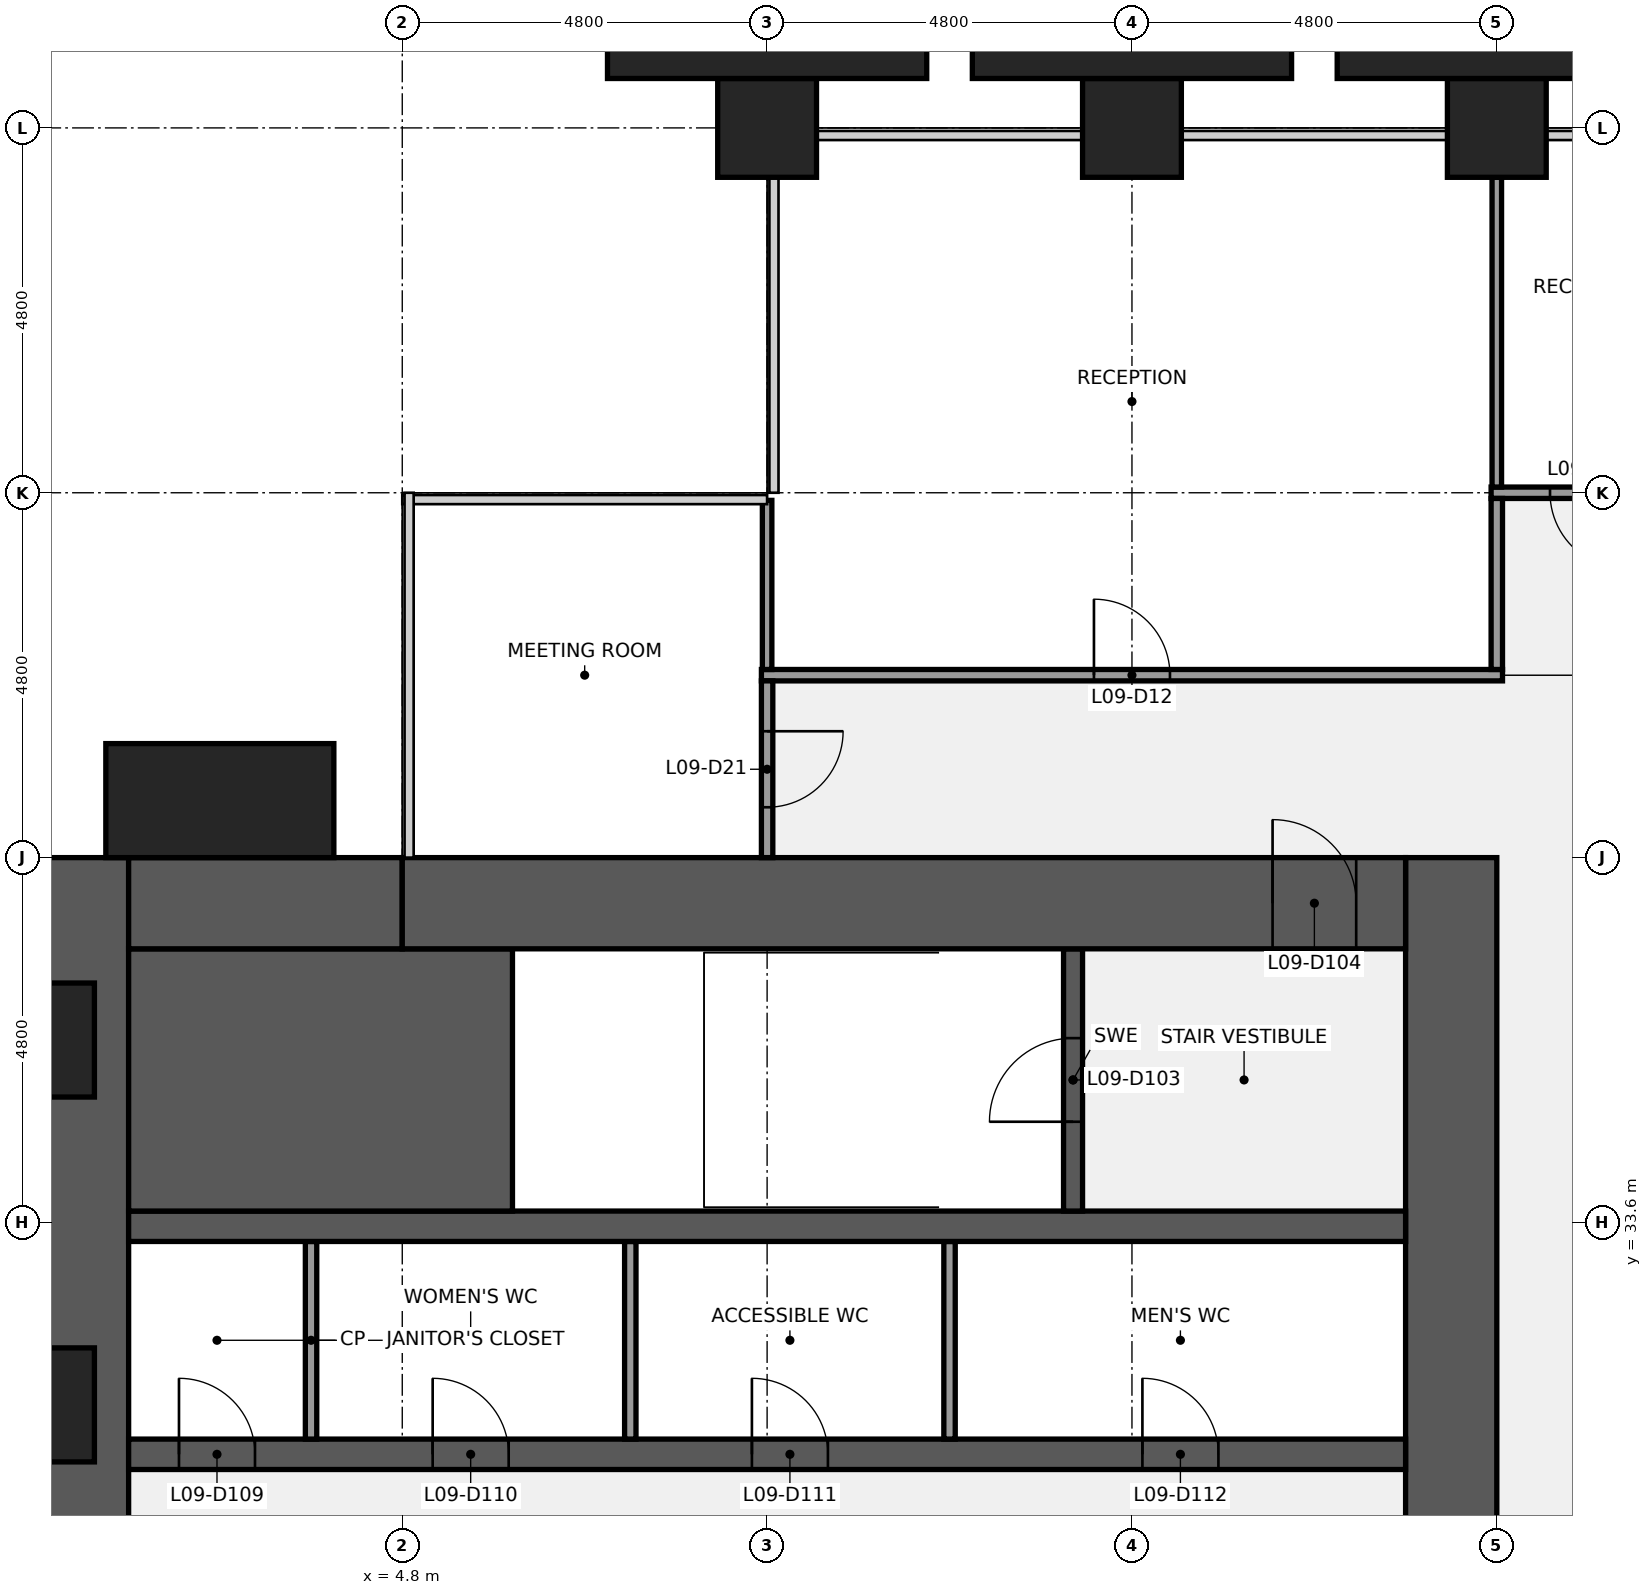
"""IFC4 building model, lengths in metres.
Left out: names, types, materials, properties, quantities, classifications, styles, units other than length and angle.
Written with IfcOpenShell. Run it as: python <this file> out.ifc"""

import sys

from ifc_helpers import new_model, si_unit, direction, frame, frame_2d, origin, origin_2d, place, context, subcontext, project, spatial, rectangle, extrude, element, fill, save


model = new_model("IFC4")
c1 = context("Model", 3, precision=1e-05, world=origin(), true_north=direction((0.0, 1.0)))
c2 = subcontext(c1, "Body", "Model", "MODEL_VIEW")
j1 = project(units=[si_unit("LENGTHUNIT", "METRE"), si_unit("PLANEANGLEUNIT", "RADIAN")], contexts=[c1])
p1 = place(None, origin())
s1 = spatial("IfcSite", under=j1, at=p1, CompositionType="ELEMENT")
p2 = place(p1, origin())
s2 = spatial("IfcBuilding", under=s1, at=p2, CompositionType="ELEMENT")
p3 = place(p2, frame((0.0, 0.0, 47.0)))
s3 = spatial("IfcBuildingStorey", under=s2, at=p3, CompositionType="ELEMENT", Elevation=47.0)
for number, where, z_axis, x_axis in (
    (1, (9.6, 48.0, 0.0), (0.0, 0.0, 1.0), (1.0, 0.0, 0.0)),
    (2, (14.4, 48.0, 0.0), (0.0, 0.0, 1.0), (1.0, 0.0, 0.0)),
    (3, (19.2, 48.0, 0.0), (0.0, 0.0, 1.0), (1.0, 0.0, 0.0)),
):
    element("IfcColumn", number, at=place(p3, frame(where, z_axis=z_axis, x_axis=x_axis)), inside=s3, PredefinedType="COLUMN", context=c2, shape_type="SweptSolid", body=[
        extrude(rectangle(XDim=1.3, YDim=1.3, at=origin_2d()), origin(), (0.0, 0.0, 1.0), 4.0),
    ])
p4 = place(p3, frame((0.6, 9.6, 0.0), z_axis=(0.0, 0.0, 1.0), x_axis=(0.0, 1.0, 0.0)))
e4 = element("IfcWall", 4, at=p4, inside=s3, PredefinedType="SHEAR", context=c2, shape_type="SweptSolid", body=[
    extrude(rectangle(XDim=28.8, YDim=1.2, at=frame_2d((14.4, 0.0))), origin(), (0.0, 0.0, 1.0), 3.84),
])
p5 = place(p4, frame((8.85, 0.0, 0.9)))
e5 = element("IfcOpeningElement", 5, at=p5, cuts=e4, PredefinedType="OPENING", context=c2, shape_type="SweptSolid", body=[
    extrude(rectangle(XDim=1.5, YDim=1.5, at=frame_2d((0.75, 0.75))), frame((0.0, 0.61, 0.0), z_axis=(0.0, -1.0, 0.0), x_axis=(1.0, 0.0, 0.0)), (0.0, 0.0, 1.0), 1.22),
])
p6 = place(p4, frame((18.45, 0.0, 0.9)))
e6 = element("IfcOpeningElement", 6, at=p6, cuts=e4, PredefinedType="OPENING", context=c2, shape_type="SweptSolid", body=[
    extrude(rectangle(XDim=1.5, YDim=1.5, at=frame_2d((0.75, 0.75))), frame((0.0, 0.61, 0.0), z_axis=(0.0, -1.0, 0.0), x_axis=(1.0, 0.0, 0.0)), (0.0, 0.0, 1.0), 1.22),
])
p7 = place(p3, frame((18.6, 38.4, 0.0), z_axis=(0.0, 0.0, 1.0), x_axis=(0.0, -1.0, 0.0)))
e7 = element("IfcWall", 7, at=p7, inside=s3, PredefinedType="SHEAR", context=c2, shape_type="SweptSolid", body=[
    extrude(rectangle(XDim=28.8, YDim=1.2, at=frame_2d((14.4, 0.0))), origin(), (0.0, 0.0, 1.0), 3.84),
])
p8 = place(p7, frame((18.3, 0.0, 0.0)))
e8 = element("IfcOpeningElement", 8, at=p8, cuts=e7, PredefinedType="OPENING", context=c2, shape_type="SweptSolid", body=[
    extrude(rectangle(XDim=1.8, YDim=2.1, at=frame_2d((0.9, 1.05))), frame((0.0, 0.61, 0.0), z_axis=(0.0, -1.0, 0.0), x_axis=(1.0, 0.0, 0.0)), (0.0, 0.0, 1.0), 1.22),
])
p9 = place(p7, frame((8.7, 0.0, 0.0)))
e9 = element("IfcOpeningElement", 9, at=p9, cuts=e7, PredefinedType="OPENING", context=c2, shape_type="SweptSolid", body=[
    extrude(rectangle(XDim=1.8, YDim=2.1, at=frame_2d((0.9, 1.05))), frame((0.0, 0.61, 0.0), z_axis=(0.0, -1.0, 0.0), x_axis=(1.0, 0.0, 0.0)), (0.0, 0.0, 1.0), 1.22),
])
p10 = place(p3, frame((1.2, 30.55, 0.0), z_axis=(0.0, 0.0, 1.0), x_axis=(1.0, 0.0, 0.0)))
e10 = element("IfcWall", 10, at=p10, inside=s3, PredefinedType="SHEAR", context=c2, shape_type="SweptSolid", body=[
    extrude(rectangle(XDim=16.8, YDim=0.4, at=frame_2d((8.4, 0.0))), origin(), (0.0, 0.0, 1.0), 3.84),
])
p11 = place(p10, frame((0.663, 0.0, 0.0)))
e11 = element("IfcOpeningElement", 11, at=p11, cuts=e10, PredefinedType="OPENING", context=c2, shape_type="SweptSolid", body=[
    extrude(rectangle(XDim=1.0, YDim=2.1, at=frame_2d((0.5, 1.05))), frame((0.0, 0.21, 0.0), z_axis=(0.0, -1.0, 0.0), x_axis=(1.0, 0.0, 0.0)), (0.0, 0.0, 1.0), 0.42),
])
p12 = place(p10, frame((4.0, 0.0, 0.0)))
e12 = element("IfcOpeningElement", 12, at=p12, cuts=e10, PredefinedType="OPENING", context=c2, shape_type="SweptSolid", body=[
    extrude(rectangle(XDim=1.0, YDim=2.1, at=frame_2d((0.5, 1.05))), frame((0.0, 0.21, 0.0), z_axis=(0.0, -1.0, 0.0), x_axis=(1.0, 0.0, 0.0)), (0.0, 0.0, 1.0), 0.42),
])
p13 = place(p10, frame((8.2, 0.0, 0.0)))
e13 = element("IfcOpeningElement", 13, at=p13, cuts=e10, PredefinedType="OPENING", context=c2, shape_type="SweptSolid", body=[
    extrude(rectangle(XDim=1.0, YDim=2.1, at=frame_2d((0.5, 1.05))), frame((0.0, 0.21, 0.0), z_axis=(0.0, -1.0, 0.0), x_axis=(1.0, 0.0, 0.0)), (0.0, 0.0, 1.0), 0.42),
])
p14 = place(p10, frame((13.337, 0.0, 0.0)))
e14 = element("IfcOpeningElement", 14, at=p14, cuts=e10, PredefinedType="OPENING", context=c2, shape_type="SweptSolid", body=[
    extrude(rectangle(XDim=1.0, YDim=2.1, at=frame_2d((0.5, 1.05))), frame((0.0, 0.21, 0.0), z_axis=(0.0, -1.0, 0.0), x_axis=(1.0, 0.0, 0.0)), (0.0, 0.0, 1.0), 0.42),
])
for number, where, z_axis, x_axis in (
    (15, (3.6, 30.75, 0.0), (0.0, 0.0, 1.0), (0.0, 1.0, 0.0)),
    (16, (7.8, 30.75, 0.0), (0.0, 0.0, 1.0), (0.0, 1.0, 0.0)),
    (17, (12.0, 30.75, 0.0), (0.0, 0.0, 1.0), (0.0, 1.0, 0.0)),
):
    element("IfcWall", number, at=place(p3, frame(where, z_axis=z_axis, x_axis=x_axis)), inside=s3, PredefinedType="PARTITIONING", context=c2, shape_type="SweptSolid", body=[
        extrude(rectangle(XDim=2.6, YDim=0.15, at=frame_2d((1.3, 0.0))), origin(), (0.0, 0.0, 1.0), 3.84),
    ])
p15 = place(p3, frame((1.2, 33.55, 0.0), z_axis=(0.0, 0.0, 1.0), x_axis=(1.0, 0.0, 0.0)))
e18 = element("IfcWall", 18, at=p15, inside=s3, PredefinedType="SHEAR", context=c2, shape_type="SweptSolid", body=[
    extrude(rectangle(XDim=16.8, YDim=0.4, at=frame_2d((8.4, 0.0))), origin(), (0.0, 0.0, 1.0), 3.84),
])
p16 = place(p3, frame((1.2, 35.475, 0.0), z_axis=(0.0, 0.0, 1.0), x_axis=(1.0, 0.0, 0.0)))
e19 = element("IfcWall", 19, at=p16, inside=s3, PredefinedType="SHEAR", context=c2, shape_type="SweptSolid", body=[
    extrude(rectangle(XDim=5.05, YDim=3.45, at=frame_2d((2.525, 0.0))), origin(), (0.0, 0.0, 1.0), 3.84),
])
p17 = place(p3, frame((13.625, 33.75, 0.0), z_axis=(0.0, 0.0, 1.0), x_axis=(0.0, 1.0, 0.0)))
e20 = element("IfcWall", 20, at=p17, inside=s3, PredefinedType="SHEAR", context=c2, shape_type="SweptSolid", body=[
    extrude(rectangle(XDim=3.45, YDim=0.25, at=frame_2d((1.725, 0.0))), origin(), (0.0, 0.0, 1.0), 3.84),
])
p18 = place(p17, frame((1.175, 0.0, 0.0)))
e21 = element("IfcOpeningElement", 21, at=p18, cuts=e20, PredefinedType="OPENING", context=c2, shape_type="SweptSolid", body=[
    extrude(rectangle(XDim=1.1, YDim=2.1, at=frame_2d((0.55, 1.05))), frame((0.0, 0.135, 0.0), z_axis=(0.0, -1.0, 0.0), x_axis=(1.0, 0.0, 0.0)), (0.0, 0.0, 1.0), 0.27),
])
p19 = place(p3, frame((1.2, 37.8, 0.0), z_axis=(0.0, 0.0, 1.0), x_axis=(1.0, 0.0, 0.0)))
e22 = element("IfcWall", 22, at=p19, inside=s3, PredefinedType="SHEAR", context=c2, shape_type="SweptSolid", body=[
    extrude(rectangle(XDim=3.6, YDim=1.2, at=frame_2d((1.8, 0.0))), origin(), (0.0, 0.0, 1.0), 3.84),
])
p20 = place(p3, frame((4.8, 37.8, 0.0), z_axis=(0.0, 0.0, 1.0), x_axis=(1.0, 0.0, 0.0)))
e23 = element("IfcWall", 23, at=p20, inside=s3, PredefinedType="SHEAR", context=c2, shape_type="SweptSolid", body=[
    extrude(rectangle(XDim=13.2, YDim=1.2, at=frame_2d((6.6, 0.0))), origin(), (0.0, 0.0, 1.0), 3.84),
])
p21 = place(p20, frame((11.45, 0.0, 0.0)))
e24 = element("IfcOpeningElement", 24, at=p21, cuts=e23, PredefinedType="OPENING", context=c2, shape_type="SweptSolid", body=[
    extrude(rectangle(XDim=1.1, YDim=2.1, at=frame_2d((0.55, 1.05))), frame((0.0, 0.61, 0.0), z_axis=(0.0, -1.0, 0.0), x_axis=(1.0, 0.0, 0.0)), (0.0, 0.0, 1.0), 1.22),
])
p22 = place(p3, frame((9.525, 40.8, 0.0), z_axis=(0.0, 0.0, 1.0), x_axis=(1.0, 0.0, 0.0)))
e25 = element("IfcWall", 25, at=p22, inside=s3, PredefinedType="PARTITIONING", context=c2, shape_type="SweptSolid", body=[
    extrude(rectangle(XDim=9.75, YDim=0.15, at=frame_2d((4.875, 0.0))), origin(), (0.0, 0.0, 1.0), 2.87),
])
p23 = place(p22, frame((4.375, 0.0, 0.0)))
e26 = element("IfcOpeningElement", 26, at=p23, cuts=e25, PredefinedType="OPENING", context=c2, shape_type="SweptSolid", body=[
    extrude(rectangle(XDim=1.0, YDim=2.1, at=frame_2d((0.5, 1.05))), frame((0.0, 0.085, 0.0), z_axis=(0.0, -1.0, 0.0), x_axis=(1.0, 0.0, 0.0)), (0.0, 0.0, 1.0), 0.17),
])
p24 = place(p3, frame((19.125, 43.2, 0.0), z_axis=(0.0, 0.0, 1.0), x_axis=(1.0, 0.0, 0.0)))
e27 = element("IfcWall", 27, at=p24, inside=s3, PredefinedType="PARTITIONING", context=c2, shape_type="SweptSolid", body=[
    extrude(rectangle(XDim=19.35, YDim=0.15, at=frame_2d((9.675, 0.0))), origin(), (0.0, 0.0, 1.0), 2.87),
])
p25 = place(p24, frame((0.775, 0.0, 0.0)))
e28 = element("IfcOpeningElement", 28, at=p25, cuts=e27, PredefinedType="OPENING", context=c2, shape_type="SweptSolid", body=[
    extrude(rectangle(XDim=1.0, YDim=2.1, at=frame_2d((0.5, 1.05))), frame((0.0, 0.085, 0.0), z_axis=(0.0, -1.0, 0.0), x_axis=(1.0, 0.0, 0.0)), (0.0, 0.0, 1.0), 0.17),
])
p26 = place(p24, frame((4.375, 0.0, 0.0)))
e29 = element("IfcOpeningElement", 29, at=p26, cuts=e27, PredefinedType="OPENING", context=c2, shape_type="SweptSolid", body=[
    extrude(rectangle(XDim=1.0, YDim=2.1, at=frame_2d((0.5, 1.05))), frame((0.0, 0.085, 0.0), z_axis=(0.0, -1.0, 0.0), x_axis=(1.0, 0.0, 0.0)), (0.0, 0.0, 1.0), 0.17),
])
p27 = place(p24, frame((7.975, 0.0, 0.0)))
e30 = element("IfcOpeningElement", 30, at=p27, cuts=e27, PredefinedType="OPENING", context=c2, shape_type="SweptSolid", body=[
    extrude(rectangle(XDim=1.0, YDim=2.1, at=frame_2d((0.5, 1.05))), frame((0.0, 0.085, 0.0), z_axis=(0.0, -1.0, 0.0), x_axis=(1.0, 0.0, 0.0)), (0.0, 0.0, 1.0), 0.17),
])
p28 = place(p24, frame((13.975, 0.0, 0.0)))
e31 = element("IfcOpeningElement", 31, at=p28, cuts=e27, PredefinedType="OPENING", context=c2, shape_type="SweptSolid", body=[
    extrude(rectangle(XDim=1.0, YDim=2.1, at=frame_2d((0.5, 1.05))), frame((0.0, 0.085, 0.0), z_axis=(0.0, -1.0, 0.0), x_axis=(1.0, 0.0, 0.0)), (0.0, 0.0, 1.0), 0.17),
])
p29 = place(p3, frame((9.6, 40.875, 0.0), z_axis=(0.0, 0.0, 1.0), x_axis=(0.0, 1.0, 0.0)))
e32 = element("IfcWall", 32, at=p29, inside=s3, PredefinedType="PARTITIONING", context=c2, shape_type="SweptSolid", body=[
    extrude(rectangle(XDim=2.225, YDim=0.125, at=frame_2d((1.113, 0.0))), origin(), (0.0, 0.0, 1.0), 2.87),
])
p30 = place(p3, frame((9.6, 38.4, 0.0), z_axis=(0.0, 0.0, 1.0), x_axis=(0.0, 1.0, 0.0)))
e33 = element("IfcWall", 33, at=p30, inside=s3, PredefinedType="PARTITIONING", context=c2, shape_type="SweptSolid", body=[
    extrude(rectangle(XDim=2.325, YDim=0.15, at=frame_2d((1.163, 0.0))), origin(), (0.0, 0.0, 1.0), 2.87),
])
p31 = place(p30, frame((0.663, 0.0, 0.0)))
e34 = element("IfcOpeningElement", 34, at=p31, cuts=e33, PredefinedType="OPENING", context=c2, shape_type="SweptSolid", body=[
    extrude(rectangle(XDim=1.0, YDim=2.1, at=frame_2d((0.5, 1.05))), frame((0.0, 0.085, 0.0), z_axis=(0.0, -1.0, 0.0), x_axis=(1.0, 0.0, 0.0)), (0.0, 0.0, 1.0), 0.17),
])
p32 = place(p3, frame((19.2, 43.275, 0.0), z_axis=(0.0, 0.0, 1.0), x_axis=(0.0, 1.0, 0.0)))
e35 = element("IfcWall", 35, at=p32, inside=s3, PredefinedType="PARTITIONING", context=c2, shape_type="SweptSolid", body=[
    extrude(rectangle(XDim=4.075, YDim=0.125, at=frame_2d((2.038, 0.0))), origin(), (0.0, 0.0, 1.0), 2.87),
])
p33 = place(p3, frame((19.2, 40.875, 0.0), z_axis=(0.0, 0.0, 1.0), x_axis=(0.0, 1.0, 0.0)))
e36 = element("IfcWall", 36, at=p33, inside=s3, PredefinedType="PARTITIONING", context=c2, shape_type="SweptSolid", body=[
    extrude(rectangle(XDim=2.25, YDim=0.15, at=frame_2d((1.125, 0.0))), origin(), (0.0, 0.0, 1.0), 2.87),
])
p34 = place(p3, frame((2.4, 39.15, 0.0), z_axis=(0.0, 0.0, 1.0), x_axis=(1.0, 0.0, 0.0)))
e37 = element("IfcColumn", 37, at=p34, inside=s3, PredefinedType="PILASTER", context=c2, shape_type="SweptSolid", body=[
    extrude(rectangle(XDim=3.0, YDim=1.5, at=origin_2d()), origin(), (0.0, 0.0, 1.0), 4.0),
])
for number, where, z_axis, x_axis in (
    (38, (9.6, 49.075, 0.0), (0.0, 0.0, 1.0), (1.0, 0.0, 0.0)),
    (39, (14.4, 49.075, 0.0), (0.0, 0.0, 1.0), (1.0, 0.0, 0.0)),
    (40, (19.2, 49.075, 0.0), (0.0, 0.0, 1.0), (1.0, 0.0, 0.0)),
):
    element("IfcColumn", number, at=place(p3, frame(where, z_axis=z_axis, x_axis=x_axis)), inside=s3, PredefinedType="PILASTER", context=c2, shape_type="SweptSolid", body=[
        extrude(rectangle(XDim=4.2, YDim=0.85, at=origin_2d()), origin(), (0.0, 0.0, 1.0), 4.0),
    ])
p35 = place(p18, origin())
e41 = element("IfcDoor", 41, at=p35, inside=s3, OperationType="SINGLE_SWING_LEFT", PredefinedType="DOOR", context=c2, shape_type="SweptSolid", body=[
    extrude(rectangle(XDim=1.1, YDim=2.1, at=frame_2d((0.55, 1.05))), frame((0.0, 0.025, 0.0), z_axis=(0.0, -1.0, 0.0), x_axis=(1.0, 0.0, 0.0)), (0.0, 0.0, 1.0), 0.05),
])
fill(e21, e41)
p36 = place(p21, origin())
e42 = element("IfcDoor", 42, at=p36, inside=s3, OperationType="SINGLE_SWING_LEFT", PredefinedType="DOOR", context=c2, shape_type="SweptSolid", body=[
    extrude(rectangle(XDim=1.1, YDim=2.1, at=frame_2d((0.55, 1.05))), frame((0.0, 0.025, 0.0), z_axis=(0.0, -1.0, 0.0), x_axis=(1.0, 0.0, 0.0)), (0.0, 0.0, 1.0), 0.05),
])
fill(e24, e42)
p37 = place(p11, origin())
e43 = element("IfcDoor", 43, at=p37, inside=s3, OperationType="SINGLE_SWING_LEFT", PredefinedType="DOOR", context=c2, shape_type="SweptSolid", body=[
    extrude(rectangle(XDim=1.0, YDim=2.1, at=frame_2d((0.5, 1.05))), frame((0.0, 0.025, 0.0), z_axis=(0.0, -1.0, 0.0), x_axis=(1.0, 0.0, 0.0)), (0.0, 0.0, 1.0), 0.05),
])
fill(e11, e43)
p38 = place(p12, origin())
e44 = element("IfcDoor", 44, at=p38, inside=s3, OperationType="SINGLE_SWING_LEFT", PredefinedType="DOOR", context=c2, shape_type="SweptSolid", body=[
    extrude(rectangle(XDim=1.0, YDim=2.1, at=frame_2d((0.5, 1.05))), frame((0.0, 0.025, 0.0), z_axis=(0.0, -1.0, 0.0), x_axis=(1.0, 0.0, 0.0)), (0.0, 0.0, 1.0), 0.05),
])
fill(e12, e44)
p39 = place(p13, origin())
e45 = element("IfcDoor", 45, at=p39, inside=s3, OperationType="SINGLE_SWING_LEFT", PredefinedType="DOOR", context=c2, shape_type="SweptSolid", body=[
    extrude(rectangle(XDim=1.0, YDim=2.1, at=frame_2d((0.5, 1.05))), frame((0.0, 0.025, 0.0), z_axis=(0.0, -1.0, 0.0), x_axis=(1.0, 0.0, 0.0)), (0.0, 0.0, 1.0), 0.05),
])
fill(e13, e45)
p40 = place(p14, origin())
e46 = element("IfcDoor", 46, at=p40, inside=s3, OperationType="SINGLE_SWING_LEFT", PredefinedType="DOOR", context=c2, shape_type="SweptSolid", body=[
    extrude(rectangle(XDim=1.0, YDim=2.1, at=frame_2d((0.5, 1.05))), frame((0.0, 0.025, 0.0), z_axis=(0.0, -1.0, 0.0), x_axis=(1.0, 0.0, 0.0)), (0.0, 0.0, 1.0), 0.05),
])
fill(e14, e46)
p41 = place(p23, origin())
e47 = element("IfcDoor", 47, at=p41, inside=s3, OperationType="SINGLE_SWING_LEFT", PredefinedType="DOOR", context=c2, shape_type="SweptSolid", body=[
    extrude(rectangle(XDim=1.0, YDim=2.1, at=frame_2d((0.5, 1.05))), frame((0.0, 0.025, 0.0), z_axis=(0.0, -1.0, 0.0), x_axis=(1.0, 0.0, 0.0)), (0.0, 0.0, 1.0), 0.05),
])
fill(e26, e47)
p42 = place(p25, origin())
e48 = element("IfcDoor", 48, at=p42, inside=s3, OperationType="SINGLE_SWING_RIGHT", PredefinedType="DOOR", context=c2, shape_type="SweptSolid", body=[
    extrude(rectangle(XDim=1.0, YDim=2.1, at=frame_2d((0.5, 1.05))), frame((0.0, 0.025, 0.0), z_axis=(0.0, -1.0, 0.0), x_axis=(1.0, 0.0, 0.0)), (0.0, 0.0, 1.0), 0.05),
])
fill(e28, e48)
p43 = place(p31, origin())
e49 = element("IfcDoor", 49, at=p43, inside=s3, OperationType="SINGLE_SWING_RIGHT", PredefinedType="DOOR", context=c2, shape_type="SweptSolid", body=[
    extrude(rectangle(XDim=1.0, YDim=2.1, at=frame_2d((0.5, 1.05))), frame((0.0, 0.025, 0.0), z_axis=(0.0, -1.0, 0.0), x_axis=(1.0, 0.0, 0.0)), (0.0, 0.0, 1.0), 0.05),
])
fill(e34, e49)
save(model, sys.argv[1])
